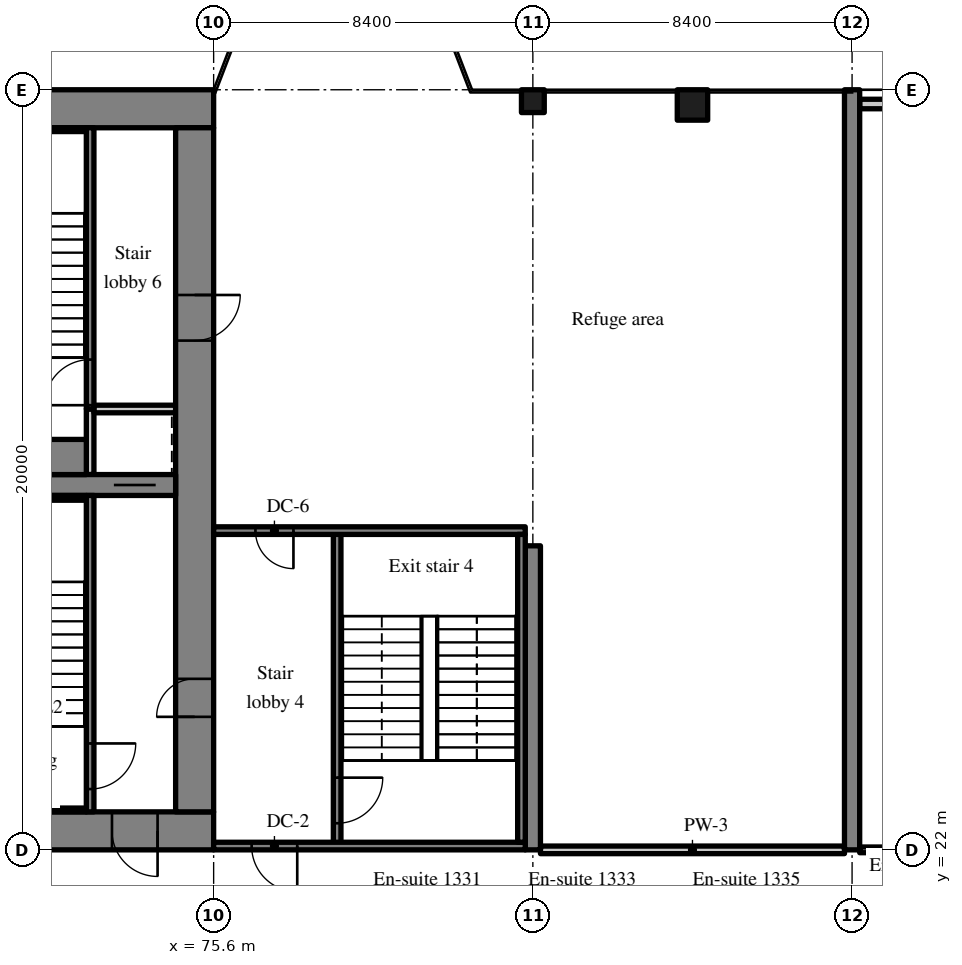
"""IFC4 building model, lengths in metres.
Left out: names, types, materials, properties, quantities, classifications, styles, units other than length and angle.
Written with IfcOpenShell. Run it as: python <this file> out.ifc"""

import sys

from ifc_helpers import new_model, si_unit, direction, frame, frame_2d, origin, origin_2d, place, context, subcontext, project, spatial, rectangle, extrude, source, transform, mapped, element, fill, save


model = new_model("IFC4")
c1 = context("Model", 3, precision=1e-05, world=origin(), true_north=direction((0.0, 1.0)))
c2 = subcontext(c1, "Body", "Model", "MODEL_VIEW")
j1 = project(units=[si_unit("LENGTHUNIT", "METRE"), si_unit("PLANEANGLEUNIT", "RADIAN")], contexts=[c1])
p1 = place(None, origin())
s1 = spatial("IfcSite", under=j1, at=p1, CompositionType="ELEMENT")
p2 = place(p1, origin())
s2 = spatial("IfcBuilding", under=s1, at=p2, CompositionType="ELEMENT")
p3 = place(p2, frame((0.0, 0.0, 58.2)))
s3 = spatial("IfcBuildingStorey", under=s2, at=p3, CompositionType="ELEMENT", Elevation=58.2)
m1 = source(origin(), c2, "Body", "SweptSolid", [
    extrude(rectangle(XDim=50.4, YDim=1.0, at=frame_2d((25.2, 0.0))), origin(), (0.0, 0.0, 1.0), 3.52),
])
p4 = place(p3, frame((25.2, 22.5, 0.0), z_axis=(0.0, 0.0, 1.0), x_axis=(1.0, 0.0, 0.0)))
e1 = element("IfcWall", 1, at=p4, inside=s3, PredefinedType="SHEAR", context=c2, shape_type="MappedRepresentation", body=[
    mapped(m1, transform((0.0, 0.0, 0.0), scale=1.0)),
])
m2 = source(origin(), c2, "Body", "SweptSolid", [
    extrude(rectangle(XDim=1.8, YDim=2.1, at=frame_2d((0.9, 1.05))), frame((0.0, 0.51, 0.0), z_axis=(0.0, -1.0, 0.0), x_axis=(1.0, 0.0, 0.0)), (0.0, 0.0, 1.0), 1.02),
])
p5 = place(p4, frame((15.9, 0.0, 0.0)))
e2 = element("IfcOpeningElement", 2, at=p5, cuts=e1, PredefinedType="OPENING", context=c2, shape_type="MappedRepresentation", body=[
    mapped(m2, transform((0.0, 0.0, 0.0), scale=1.0)),
])
m3 = source(origin(), c2, "Body", "SweptSolid", [
    extrude(rectangle(XDim=1.2, YDim=2.1, at=frame_2d((0.6, 1.05))), frame((0.0, 0.51, 0.0), z_axis=(0.0, -1.0, 0.0), x_axis=(1.0, 0.0, 0.0)), (0.0, 0.0, 1.0), 1.02),
])
p6 = place(p4, frame((26.987, 0.0, 0.0)))
e3 = element("IfcOpeningElement", 3, at=p6, cuts=e1, PredefinedType="OPENING", context=c2, shape_type="MappedRepresentation", body=[
    mapped(m3, transform((0.0, 0.0, 0.0), scale=1.0)),
])
m4 = source(origin(), c2, "Body", "SweptSolid", [
    extrude(rectangle(XDim=0.9, YDim=2.1, at=frame_2d((0.45, 1.05))), frame((0.0, 0.51, 0.0), z_axis=(0.0, -1.0, 0.0), x_axis=(1.0, 0.0, 0.0)), (0.0, 0.0, 1.0), 1.02),
])
p7 = place(p4, frame((34.5, 0.0, 0.0)))
e4 = element("IfcOpeningElement", 4, at=p7, cuts=e1, PredefinedType="OPENING", context=c2, shape_type="MappedRepresentation", body=[
    mapped(m4, transform((0.0, 0.0, 0.0), scale=1.0)),
])
p8 = place(p4, frame((31.5, 0.0, 0.0)))
e5 = element("IfcOpeningElement", 5, at=p8, cuts=e1, PredefinedType="OPENING", context=c2, shape_type="MappedRepresentation", body=[
    mapped(m4, transform((0.0, 0.0, 0.0), scale=1.0)),
])
p9 = place(p4, frame((39.769, 0.0, 0.0)))
e6 = element("IfcOpeningElement", 6, at=p9, cuts=e1, PredefinedType="OPENING", context=c2, shape_type="MappedRepresentation", body=[
    mapped(m4, transform((0.0, 0.0, 0.0), scale=1.0)),
])
p10 = place(p4, frame((36.756, 0.0, 0.0)))
e7 = element("IfcOpeningElement", 7, at=p10, cuts=e1, PredefinedType="OPENING", context=c2, shape_type="MappedRepresentation", body=[
    mapped(m4, transform((0.0, 0.0, 0.0), scale=1.0)),
])
p11 = place(p4, frame((6.438, 0.0, 0.0)))
e8 = element("IfcOpeningElement", 8, at=p11, cuts=e1, PredefinedType="OPENING", context=c2, shape_type="MappedRepresentation", body=[
    mapped(m3, transform((0.0, 0.0, 0.0), scale=1.0)),
])
p12 = place(p4, frame((47.725, 0.0, 0.0)))
e9 = element("IfcOpeningElement", 9, at=p12, cuts=e1, PredefinedType="OPENING", context=c2, shape_type="MappedRepresentation", body=[
    mapped(m3, transform((0.0, 0.0, 0.0), scale=1.0)),
])
p13 = place(p3, frame((25.2, 41.5, 0.0), z_axis=(0.0, 0.0, 1.0), x_axis=(1.0, 0.0, 0.0)))
e10 = element("IfcWall", 10, at=p13, inside=s3, PredefinedType="SHEAR", context=c2, shape_type="MappedRepresentation", body=[
    mapped(m1, transform((0.0, 0.0, 0.0), scale=1.0)),
])
m5 = source(origin(), c2, "Body", "SweptSolid", [
    extrude(rectangle(XDim=18.0, YDim=1.0, at=frame_2d((9.0, 0.0))), origin(), (0.0, 0.0, 1.0), 3.52),
])
p14 = place(p3, frame((75.1, 23.0, 0.0), z_axis=(0.0, 0.0, 1.0), x_axis=(0.0, 1.0, 0.0)))
e11 = element("IfcWall", 11, at=p14, inside=s3, PredefinedType="SHEAR", context=c2, shape_type="MappedRepresentation", body=[
    mapped(m5, transform((0.0, 0.0, 0.0), scale=1.0)),
])
m6 = source(origin(), c2, "Body", "SweptSolid", [
    extrude(rectangle(XDim=1.0, YDim=2.1, at=frame_2d((0.5, 1.05))), frame((0.0, 0.51, 0.0), z_axis=(0.0, -1.0, 0.0), x_axis=(1.0, 0.0, 0.0)), (0.0, 0.0, 1.0), 1.02),
])
p15 = place(p14, frame((2.5, 0.0, 0.0)))
e12 = element("IfcOpeningElement", 12, at=p15, cuts=e11, PredefinedType="OPENING", context=c2, shape_type="MappedRepresentation", body=[
    mapped(m6, transform((0.0, 0.0, 0.0), scale=1.0)),
])
p16 = place(p14, frame((12.4, 0.0, 0.0)))
e13 = element("IfcOpeningElement", 13, at=p16, cuts=e11, PredefinedType="OPENING", context=c2, shape_type="MappedRepresentation", body=[
    mapped(m3, transform((0.0, 0.0, 0.0), scale=1.0)),
])
m7 = source(origin(), c2, "Body", "SweptSolid", [
    extrude(rectangle(XDim=7.125, YDim=0.55, at=frame_2d((3.562, 0.0))), origin(), (0.0, 0.0, 1.0), 3.52),
])
p17 = place(p3, frame((67.475, 31.6, 0.0), z_axis=(0.0, 0.0, 1.0), x_axis=(1.0, 0.0, 0.0)))
e14 = element("IfcWall", 14, at=p17, inside=s3, PredefinedType="SHEAR", context=c2, shape_type="MappedRepresentation", body=[
    mapped(m7, transform((0.0, 0.0, 0.0), scale=1.0)),
])
m8 = source(origin(), c2, "Body", "SweptSolid", [
    extrude(rectangle(XDim=1.1, YDim=2.1, at=frame_2d((0.55, 1.05))), frame((0.0, 0.285, 0.0), z_axis=(0.0, -1.0, 0.0), x_axis=(1.0, 0.0, 0.0)), (0.0, 0.0, 1.0), 0.57),
])
p18 = place(p17, frame((5.5, 0.0, 0.0)))
e15 = element("IfcOpeningElement", 15, at=p18, cuts=e14, PredefinedType="OPENING", context=c2, shape_type="MappedRepresentation", body=[
    mapped(m8, transform((0.0, 0.0, 0.0), scale=1.0)),
])
m9 = source(origin(), c2, "Body", "SweptSolid", [
    extrude(rectangle(XDim=8.0, YDim=0.4, at=frame_2d((4.0, 0.0))), origin(), (0.0, 0.0, 1.0), 3.52),
])
p19 = place(p3, frame((84.0, 22.0, 0.0), z_axis=(0.0, 0.0, 1.0), x_axis=(0.0, 1.0, 0.0)))
e16 = element("IfcWall", 16, at=p19, inside=s3, PredefinedType="SHEAR", context=c2, shape_type="MappedRepresentation", body=[
    mapped(m9, transform((0.0, 0.0, 0.0), scale=1.0)),
])
m10 = source(origin(), c2, "Body", "SweptSolid", [
    extrude(rectangle(XDim=20.0, YDim=0.4, at=frame_2d((10.0, 0.0))), origin(), (0.0, 0.0, 1.0), 3.52),
])
p20 = place(p3, frame((92.4, 22.0, 0.0), z_axis=(0.0, 0.0, 1.0), x_axis=(0.0, 1.0, 0.0)))
e17 = element("IfcWall", 17, at=p20, inside=s3, PredefinedType="SHEAR", context=c2, shape_type="MappedRepresentation", body=[
    mapped(m10, transform((0.0, 0.0, 0.0), scale=1.0)),
])
m11 = source(origin(), c2, "Body", "SweptSolid", [
    extrude(rectangle(XDim=0.6, YDim=0.6, at=origin_2d()), origin(), (0.0, 0.0, 1.0), 3.52),
])
p21 = place(p3, frame((84.0, 41.7, 0.0), z_axis=(0.0, 0.0, 1.0), x_axis=(1.0, 0.0, 0.0)))
e18 = element("IfcColumn", 18, at=p21, inside=s3, PredefinedType="COLUMN", context=c2, shape_type="MappedRepresentation", body=[
    mapped(m11, transform((0.0, 0.0, 0.0), scale=1.0)),
])
m12 = source(origin(), c2, "Body", "SweptSolid", [
    extrude(rectangle(XDim=0.8, YDim=0.8, at=origin_2d()), origin(), (0.0, 0.0, 1.0), 3.52),
])
p22 = place(p3, frame((88.2, 41.6, 0.0), z_axis=(0.0, 0.0, 1.0), x_axis=(1.0, 0.0, 0.0)))
e19 = element("IfcColumn", 19, at=p22, inside=s3, PredefinedType="COLUMN", context=c2, shape_type="MappedRepresentation", body=[
    mapped(m12, transform((0.0, 0.0, 0.0), scale=1.0)),
])
m13 = source(origin(), c2, "Body", "SweptSolid", [
    extrude(rectangle(XDim=4.045, YDim=0.25, at=frame_2d((2.022, 0.0))), origin(), (0.0, 0.0, 1.0), 2.82),
])
p23 = place(p3, frame((96.645, 41.625, 0.0), z_axis=(0.0, 0.0, 1.0), x_axis=(-1.0, 0.0, 0.0)))
e20 = element("IfcWall", 20, at=p23, inside=s3, PredefinedType="SOLIDWALL", context=c2, shape_type="MappedRepresentation", body=[
    mapped(m13, transform((0.0, 0.0, 0.0), scale=1.0)),
])
m14 = source(origin(), c2, "Body", "SweptSolid", [
    extrude(rectangle(XDim=1.5, YDim=1.5, at=frame_2d((0.75, 0.75))), frame((0.0, 0.135, 0.0), z_axis=(0.0, -1.0, 0.0), x_axis=(1.0, 0.0, 0.0)), (0.0, 0.0, 1.0), 0.27),
])
p24 = place(p23, frame((1.272, 0.0, 0.9)))
e21 = element("IfcOpeningElement", 21, at=p24, cuts=e20, PredefinedType="OPENING", context=c2, shape_type="MappedRepresentation", body=[
    mapped(m14, transform((0.0, 0.0, 0.0), scale=1.0)),
])
m15 = source(origin(), c2, "Body", "SweptSolid", [
    extrude(rectangle(XDim=8.325, YDim=0.2, at=frame_2d((4.163, 0.0))), origin(), (0.0, 0.0, 1.0), 3.52),
])
p25 = place(p3, frame((72.35, 23.0, 0.0), z_axis=(0.0, 0.0, 1.0), x_axis=(0.0, 1.0, 0.0)))
e22 = element("IfcWall", 22, at=p25, inside=s3, PredefinedType="SOLIDWALL", context=c2, shape_type="MappedRepresentation", body=[
    mapped(m15, transform((0.0, 0.0, 0.0), scale=1.0)),
])
m16 = source(origin(), c2, "Body", "SweptSolid", [
    extrude(rectangle(XDim=1.2, YDim=2.1, at=frame_2d((0.6, 1.05))), frame((0.0, 0.11, 0.0), z_axis=(0.0, -1.0, 0.0), x_axis=(1.0, 0.0, 0.0)), (0.0, 0.0, 1.0), 0.22),
])
p26 = place(p25, frame((0.6, 0.0, 0.0)))
e23 = element("IfcOpeningElement", 23, at=p26, cuts=e22, PredefinedType="OPENING", context=c2, shape_type="MappedRepresentation", body=[
    mapped(m16, transform((0.0, 0.0, 0.0), scale=1.0)),
])
m17 = source(origin(), c2, "Body", "SweptSolid", [
    extrude(rectangle(XDim=1.725, YDim=0.2, at=frame_2d((0.863, 0.0))), origin(), (0.0, 0.0, 1.0), 3.52),
])
p27 = place(p3, frame((72.35, 31.875, 0.0), z_axis=(0.0, 0.0, 1.0), x_axis=(0.0, 1.0, 0.0)))
e24 = element("IfcWall", 24, at=p27, inside=s3, PredefinedType="SOLIDWALL", context=c2, shape_type="MappedRepresentation", body=[
    mapped(m17, transform((0.0, 0.0, 0.0), scale=1.0)),
])
m18 = source(origin(), c2, "Body", "SweptSolid", [
    extrude(rectangle(XDim=2.15, YDim=0.2, at=frame_2d((1.075, 0.0))), origin(), (0.0, 0.0, 1.0), 3.52),
])
p28 = place(p3, frame((72.45, 33.6, 0.0), z_axis=(0.0, 0.0, 1.0), x_axis=(1.0, 0.0, 0.0)))
e25 = element("IfcWall", 25, at=p28, inside=s3, PredefinedType="SOLIDWALL", context=c2, shape_type="MappedRepresentation", body=[
    mapped(m18, transform((0.0, 0.0, 0.0), scale=1.0)),
])
m19 = source(origin(), c2, "Body", "SweptSolid", [
    extrude(rectangle(XDim=7.4, YDim=0.2, at=frame_2d((3.7, 0.0))), origin(), (0.0, 0.0, 1.0), 3.52),
])
p29 = place(p3, frame((72.35, 33.6, 0.0), z_axis=(0.0, 0.0, 1.0), x_axis=(0.0, 1.0, 0.0)))
e26 = element("IfcWall", 26, at=p29, inside=s3, PredefinedType="SOLIDWALL", context=c2, shape_type="MappedRepresentation", body=[
    mapped(m19, transform((0.0, 0.0, 0.0), scale=1.0)),
])
p30 = place(p29, frame((0.1, 0.0, 0.0)))
e27 = element("IfcOpeningElement", 27, at=p30, cuts=e26, PredefinedType="OPENING", context=c2, shape_type="MappedRepresentation", body=[
    mapped(m16, transform((0.0, 0.0, 0.0), scale=1.0)),
])
m20 = source(origin(), c2, "Body", "SweptSolid", [
    extrude(rectangle(XDim=8.3, YDim=0.2, at=frame_2d((4.15, 0.0))), origin(), (0.0, 0.0, 1.0), 3.52),
])
p31 = place(p3, frame((78.85, 22.1, 0.0), z_axis=(0.0, 0.0, 1.0), x_axis=(0.0, 1.0, 0.0)))
e28 = element("IfcWall", 28, at=p31, inside=s3, PredefinedType="SOLIDWALL", context=c2, shape_type="MappedRepresentation", body=[
    mapped(m20, transform((0.0, 0.0, 0.0), scale=1.0)),
])
p32 = place(p31, frame((0.6, 0.0, 0.0)))
e29 = element("IfcOpeningElement", 29, at=p32, cuts=e28, PredefinedType="OPENING", context=c2, shape_type="MappedRepresentation", body=[
    mapped(m16, transform((0.0, 0.0, 0.0), scale=1.0)),
])
m21 = source(origin(), c2, "Body", "SweptSolid", [
    extrude(rectangle(XDim=8.2, YDim=0.2, at=frame_2d((4.1, 0.0))), origin(), (0.0, 0.0, 1.0), 3.52),
])
p33 = place(p3, frame((83.8, 22.1, 0.0), z_axis=(0.0, 0.0, 1.0), x_axis=(-1.0, 0.0, 0.0)))
e30 = element("IfcWall", 30, at=p33, inside=s3, PredefinedType="SOLIDWALL", context=c2, shape_type="MappedRepresentation", body=[
    mapped(m21, transform((0.0, 0.0, 0.0), scale=1.0)),
])
p34 = place(p33, frame((6.0, 0.0, 0.0)))
e31 = element("IfcOpeningElement", 31, at=p34, cuts=e30, PredefinedType="OPENING", context=c2, shape_type="MappedRepresentation", body=[
    mapped(m16, transform((0.0, 0.0, 0.0), scale=1.0)),
])
p35 = place(p3, frame((83.8, 30.4, 0.0), z_axis=(0.0, 0.0, 1.0), x_axis=(-1.0, 0.0, 0.0)))
e32 = element("IfcWall", 32, at=p35, inside=s3, PredefinedType="SOLIDWALL", context=c2, shape_type="MappedRepresentation", body=[
    mapped(m21, transform((0.0, 0.0, 0.0), scale=1.0)),
])
m22 = source(origin(), c2, "Body", "SweptSolid", [
    extrude(rectangle(XDim=1.0, YDim=2.1, at=frame_2d((0.5, 1.05))), frame((0.0, 0.11, 0.0), z_axis=(0.0, -1.0, 0.0), x_axis=(1.0, 0.0, 0.0)), (0.0, 0.0, 1.0), 0.22),
])
p36 = place(p35, frame((6.1, 0.0, 0.0)))
e33 = element("IfcOpeningElement", 33, at=p36, cuts=e32, PredefinedType="OPENING", context=c2, shape_type="MappedRepresentation", body=[
    mapped(m22, transform((0.0, 0.0, 0.0), scale=1.0)),
])
m23 = source(origin(), c2, "Body", "SweptSolid", [
    extrude(rectangle(XDim=4.775, YDim=0.1, at=frame_2d((2.387, 0.0))), origin(), (0.0, 0.0, 1.0), 3.52),
])
p37 = place(p3, frame((67.475, 23.05, 0.0), z_axis=(0.0, 0.0, 1.0), x_axis=(1.0, 0.0, 0.0)))
e34 = element("IfcWall", 34, at=p37, inside=s3, PredefinedType="SOLIDWALL", context=c2, shape_type="MappedRepresentation", body=[
    mapped(m23, transform((0.0, 0.0, 0.0), scale=1.0)),
])
m24 = source(origin(), c2, "Body", "SweptSolid", [
    extrude(rectangle(XDim=4.775, YDim=0.125, at=frame_2d((2.387, 0.0))), origin(), (0.0, 0.0, 1.0), 3.52),
])
p38 = place(p3, frame((67.475, 31.262, 0.0), z_axis=(0.0, 0.0, 1.0), x_axis=(1.0, 0.0, 0.0)))
e35 = element("IfcWall", 35, at=p38, inside=s3, PredefinedType="SOLIDWALL", context=c2, shape_type="MappedRepresentation", body=[
    mapped(m24, transform((0.0, 0.0, 0.0), scale=1.0)),
])
p39 = place(p3, frame((67.475, 40.95, 0.0), z_axis=(0.0, 0.0, 1.0), x_axis=(1.0, 0.0, 0.0)))
e36 = element("IfcWall", 36, at=p39, inside=s3, PredefinedType="SOLIDWALL", context=c2, shape_type="MappedRepresentation", body=[
    mapped(m23, transform((0.0, 0.0, 0.0), scale=1.0)),
])
m25 = source(origin(), c2, "Body", "SweptSolid", [
    extrude(rectangle(XDim=4.775, YDim=0.925, at=frame_2d((2.387, 0.0))), origin(), (0.0, 0.0, 1.0), 3.52),
])
p40 = place(p3, frame((67.475, 32.337, 0.0), z_axis=(0.0, 0.0, 1.0), x_axis=(1.0, 0.0, 0.0)))
e37 = element("IfcWall", 37, at=p40, inside=s3, PredefinedType="SOLIDWALL", context=c2, shape_type="MappedRepresentation", body=[
    mapped(m25, transform((0.0, 0.0, 0.0), scale=1.0)),
])
m26 = source(origin(), c2, "Body", "SweptSolid", [
    extrude(rectangle(XDim=8.1, YDim=0.2, at=frame_2d((4.05, 0.0))), origin(), (0.0, 0.0, 1.0), 3.52),
])
p41 = place(p3, frame((83.7, 22.2, 0.0), z_axis=(0.0, 0.0, 1.0), x_axis=(0.0, 1.0, 0.0)))
e38 = element("IfcWall", 38, at=p41, inside=s3, PredefinedType="SOLIDWALL", context=c2, shape_type="MappedRepresentation", body=[
    mapped(m26, transform((0.0, 0.0, 0.0), scale=1.0)),
])
m27 = source(origin(), c2, "Body", "SweptSolid", [
    extrude(rectangle(XDim=7.8, YDim=0.15, at=frame_2d((3.9, 0.0))), origin(), (0.0, 0.0, 1.0), 2.82),
])
p42 = place(p3, frame((92.6, 22.0, 0.0), z_axis=(0.0, 0.0, 1.0), x_axis=(1.0, 0.0, 0.0)))
e39 = element("IfcWall", 39, at=p42, inside=s3, PredefinedType="PARTITIONING", context=c2, shape_type="MappedRepresentation", body=[
    mapped(m27, transform((0.0, 0.0, 0.0), scale=1.0)),
])
m28 = source(origin(), c2, "Body", "SweptSolid", [
    extrude(rectangle(XDim=1.8, YDim=2.1, at=frame_2d((0.9, 1.05))), frame((0.0, 0.085, 0.0), z_axis=(0.0, -1.0, 0.0), x_axis=(1.0, 0.0, 0.0)), (0.0, 0.0, 1.0), 0.17),
])
p43 = place(p42, frame((3.0, 0.0, 0.0)))
e40 = element("IfcOpeningElement", 40, at=p43, cuts=e39, PredefinedType="OPENING", context=c2, shape_type="MappedRepresentation", body=[
    mapped(m28, transform((0.0, 0.0, 0.0), scale=1.0)),
])
m29 = source(origin(), c2, "Body", "SweptSolid", [
    extrude(rectangle(XDim=8.0, YDim=0.2, at=frame_2d((4.0, 0.0))), origin(), (0.0, 0.0, 1.0), 2.82),
])
p44 = place(p3, frame((84.2, 22.0, 0.0), z_axis=(0.0, 0.0, 1.0), x_axis=(1.0, 0.0, 0.0)))
e41 = element("IfcWall", 41, at=p44, inside=s3, PredefinedType="PARTITIONING", context=c2, shape_type="MappedRepresentation", body=[
    mapped(m29, transform((0.0, 0.0, 0.0), scale=1.0)),
])
m30 = source(origin(), c2, "Body", "SweptSolid", [
    extrude(rectangle(XDim=1.2, YDim=2.1, at=frame_2d((0.6, 1.05))), frame((0.0, 0.025, 0.0), z_axis=(0.0, -1.0, 0.0), x_axis=(1.0, 0.0, 0.0)), (0.0, 0.0, 1.0), 0.05),
])
p45 = place(p26, origin())
e42 = element("IfcDoor", 42, at=p45, inside=s3, OperationType="SINGLE_SWING_RIGHT", PredefinedType="DOOR", context=c2, shape_type="MappedRepresentation", body=[
    mapped(m30, transform((0.0, 0.0, 0.0), scale=1.0)),
])
fill(e23, e42)
m31 = source(origin(), c2, "Body", "SweptSolid", [
    extrude(rectangle(XDim=1.2, YDim=2.1, at=frame_2d((0.6, 1.05))), frame((0.0, 0.375, 0.0), z_axis=(0.0, -1.0, 0.0), x_axis=(1.0, 0.0, 0.0)), (0.0, 0.0, 1.0), 0.05),
])
p46 = place(p12, origin())
e43 = element("IfcDoor", 43, at=p46, inside=s3, OperationType="SINGLE_SWING_RIGHT", PredefinedType="DOOR", context=c2, shape_type="MappedRepresentation", body=[
    mapped(m31, transform((0.0, 0.0, 0.0), scale=1.0)),
])
fill(e9, e43)
m32 = source(origin(), c2, "Body", "SweptSolid", [
    extrude(rectangle(XDim=1.1, YDim=2.1, at=frame_2d((0.55, 1.05))), frame((0.0, 0.025, 0.0), z_axis=(0.0, -1.0, 0.0), x_axis=(1.0, 0.0, 0.0)), (0.0, 0.0, 1.0), 0.05),
])
p47 = place(p18, origin())
e44 = element("IfcDoor", 44, at=p47, inside=s3, OperationType="SLIDING_TO_RIGHT", PredefinedType="DOOR", context=c2, shape_type="MappedRepresentation", body=[
    mapped(m32, transform((0.0, 0.0, 0.0), scale=1.0)),
])
fill(e15, e44)
m33 = source(origin(), c2, "Body", "SweptSolid", [
    extrude(rectangle(XDim=1.0, YDim=2.1, at=frame_2d((0.5, 1.05))), frame((0.0, 0.025, 0.0), z_axis=(0.0, -1.0, 0.0), x_axis=(1.0, 0.0, 0.0)), (0.0, 0.0, 1.0), 0.05),
])
p48 = place(p15, origin())
e45 = element("IfcDoor", 45, at=p48, inside=s3, OperationType="SINGLE_SWING_LEFT", PredefinedType="DOOR", context=c2, shape_type="MappedRepresentation", body=[
    mapped(m33, transform((0.0, 0.0, 0.0), scale=1.0)),
])
fill(e12, e45)
p49 = place(p30, origin())
e46 = element("IfcDoor", 46, at=p49, inside=s3, OperationType="SINGLE_SWING_LEFT", PredefinedType="DOOR", context=c2, shape_type="MappedRepresentation", body=[
    mapped(m30, transform((0.0, 0.0, 0.0), scale=1.0)),
])
fill(e27, e46)
p50 = place(p16, origin())
e47 = element("IfcDoor", 47, at=p50, inside=s3, OperationType="SINGLE_SWING_RIGHT", PredefinedType="DOOR", context=c2, shape_type="MappedRepresentation", body=[
    mapped(m30, transform((0.0, 0.0, 0.0), scale=1.0)),
])
fill(e13, e47)
p51 = place(p32, origin())
e48 = element("IfcDoor", 48, at=p51, inside=s3, OperationType="SINGLE_SWING_RIGHT", PredefinedType="DOOR", context=c2, shape_type="MappedRepresentation", body=[
    mapped(m30, transform((0.0, 0.0, 0.0), scale=1.0)),
])
fill(e29, e48)
p52 = place(p34, origin())
e49 = element("IfcDoor", 49, at=p52, inside=s3, OperationType="SINGLE_SWING_LEFT", PredefinedType="DOOR", context=c2, shape_type="MappedRepresentation", body=[
    mapped(m30, transform((0.0, 0.0, 0.0), scale=1.0)),
])
fill(e31, e49)
p53 = place(p36, origin())
e50 = element("IfcDoor", 50, at=p53, inside=s3, OperationType="SINGLE_SWING_LEFT", PredefinedType="DOOR", context=c2, shape_type="MappedRepresentation", body=[
    mapped(m33, transform((0.0, 0.0, 0.0), scale=1.0)),
])
fill(e33, e50)
save(model, sys.argv[1])
